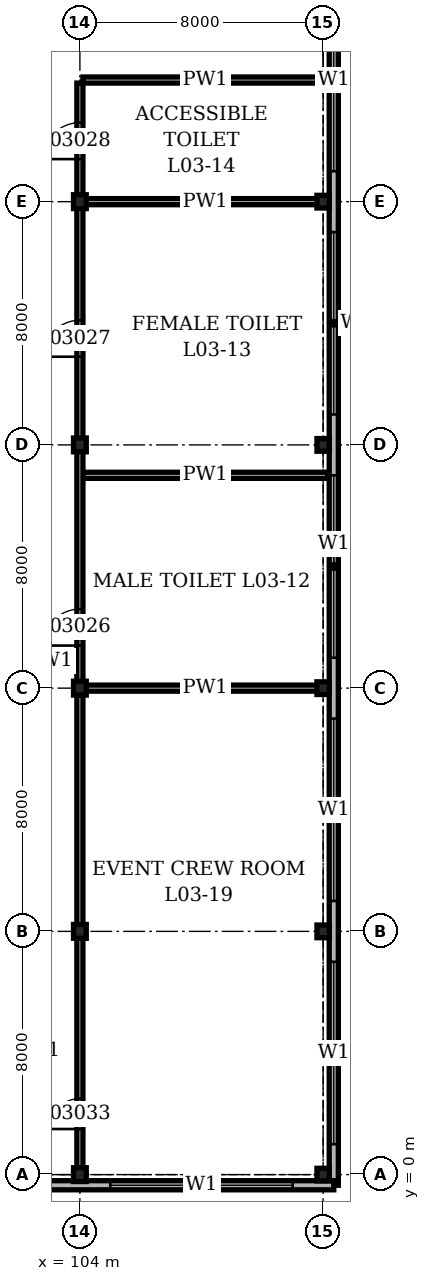
"""IFC4 building model, lengths in metres.
Left out: names, types, materials, properties, quantities, classifications, styles, units other than length and angle.
Written with IfcOpenShell. Run it as: python <this file> out.ifc"""

import sys

from ifc_helpers import new_model, si_unit, direction, frame, frame_2d, origin, origin_2d, place, context, subcontext, project, spatial, rectangle, i_section, extrude, element, fill, save


model = new_model("IFC4")
c1 = context("Model", 3, precision=1e-05, world=origin(), true_north=direction((0.0, 1.0)))
c2 = subcontext(c1, "Body", "Model", "MODEL_VIEW")
j1 = project(units=[si_unit("LENGTHUNIT", "METRE"), si_unit("PLANEANGLEUNIT", "RADIAN")], contexts=[c1])
p1 = place(None, origin())
s1 = spatial("IfcSite", under=j1, at=p1, CompositionType="ELEMENT")
p2 = place(p1, origin())
s2 = spatial("IfcBuilding", under=s1, at=p2, CompositionType="ELEMENT")
p3 = place(p2, frame((0.0, 0.0, 14.9)))
s3 = spatial("IfcBuildingStorey", under=s2, at=p3, CompositionType="ELEMENT", Elevation=14.9)
for number, where, z_axis, x_axis in (
    (1, (104.0, 0.0, 0.0), (0.0, 0.0, 1.0), (1.0, 0.0, 0.0)),
    (2, (104.0, 8.0, 0.0), (0.0, 0.0, 1.0), (1.0, 0.0, 0.0)),
    (3, (104.0, 16.0, 0.0), (0.0, 0.0, 1.0), (1.0, 0.0, 0.0)),
    (4, (104.0, 24.0, 0.0), (0.0, 0.0, 1.0), (1.0, 0.0, 0.0)),
    (5, (104.0, 32.0, 0.0), (0.0, 0.0, 1.0), (1.0, 0.0, 0.0)),
):
    element("IfcColumn", number, at=place(p3, frame(where, z_axis=z_axis, x_axis=x_axis)), inside=s3, PredefinedType="COLUMN", context=c2, shape_type="SweptSolid", body=[
        extrude(i_section(OverallWidth=0.419, OverallDepth=0.455, WebThickness=0.042, FlangeThickness=0.068, at=origin_2d()), origin(), (0.0, 0.0, 1.0), 5.0),
    ])
for number, where, z_axis, x_axis in (
    (6, (112.0, 0.0, 0.0), (0.0, 0.0, 1.0), (1.0, 0.0, 0.0)),
    (7, (112.0, 8.0, 0.0), (0.0, 0.0, 1.0), (1.0, 0.0, 0.0)),
    (8, (112.0, 16.0, 0.0), (0.0, 0.0, 1.0), (1.0, 0.0, 0.0)),
    (9, (112.0, 24.0, 0.0), (0.0, 0.0, 1.0), (1.0, 0.0, 0.0)),
    (10, (112.0, 32.0, 0.0), (0.0, 0.0, 1.0), (1.0, 0.0, 0.0)),
):
    element("IfcColumn", number, at=place(p3, frame(where, z_axis=z_axis, x_axis=x_axis)), inside=s3, PredefinedType="COLUMN", context=c2, shape_type="SweptSolid", body=[
        extrude(i_section(OverallWidth=0.406, OverallDepth=0.417, WebThickness=0.03, FlangeThickness=0.048, at=origin_2d()), origin(), (0.0, 0.0, 1.0), 5.0),
    ])
p4 = place(p3, frame((-0.35, -0.35, 0.0), z_axis=(0.0, 0.0, 1.0), x_axis=(1.0, 0.0, 0.0)))
e11 = element("IfcWall", 11, at=p4, inside=s3, PredefinedType="SOLIDWALL", context=c2, shape_type="SweptSolid", body=[
    extrude(rectangle(XDim=112.7, YDim=0.3, at=frame_2d((56.35, 0.0))), origin(), (0.0, 0.0, 1.0), 5.0),
])
p5 = place(p4, frame((1.35, 0.0, 1.0)))
e12 = element("IfcOpeningElement", 12, at=p5, cuts=e11, PredefinedType="OPENING", context=c2, shape_type="SweptSolid", body=[
    extrude(rectangle(XDim=6.0, YDim=1.5, at=frame_2d((3.0, 0.75))), frame((0.0, 0.16, 0.0), z_axis=(0.0, -1.0, 0.0), x_axis=(1.0, 0.0, 0.0)), (0.0, 0.0, 1.0), 0.32),
])
p6 = place(p4, frame((9.35, 0.0, 1.0)))
e13 = element("IfcOpeningElement", 13, at=p6, cuts=e11, PredefinedType="OPENING", context=c2, shape_type="SweptSolid", body=[
    extrude(rectangle(XDim=6.0, YDim=1.5, at=frame_2d((3.0, 0.75))), frame((0.0, 0.16, 0.0), z_axis=(0.0, -1.0, 0.0), x_axis=(1.0, 0.0, 0.0)), (0.0, 0.0, 1.0), 0.32),
])
p7 = place(p4, frame((17.35, 0.0, 1.0)))
e14 = element("IfcOpeningElement", 14, at=p7, cuts=e11, PredefinedType="OPENING", context=c2, shape_type="SweptSolid", body=[
    extrude(rectangle(XDim=6.0, YDim=1.5, at=frame_2d((3.0, 0.75))), frame((0.0, 0.16, 0.0), z_axis=(0.0, -1.0, 0.0), x_axis=(1.0, 0.0, 0.0)), (0.0, 0.0, 1.0), 0.32),
])
p8 = place(p4, frame((25.35, 0.0, 1.0)))
e15 = element("IfcOpeningElement", 15, at=p8, cuts=e11, PredefinedType="OPENING", context=c2, shape_type="SweptSolid", body=[
    extrude(rectangle(XDim=6.0, YDim=1.5, at=frame_2d((3.0, 0.75))), frame((0.0, 0.16, 0.0), z_axis=(0.0, -1.0, 0.0), x_axis=(1.0, 0.0, 0.0)), (0.0, 0.0, 1.0), 0.32),
])
p9 = place(p4, frame((33.35, 0.0, 1.0)))
e16 = element("IfcOpeningElement", 16, at=p9, cuts=e11, PredefinedType="OPENING", context=c2, shape_type="SweptSolid", body=[
    extrude(rectangle(XDim=6.0, YDim=1.5, at=frame_2d((3.0, 0.75))), frame((0.0, 0.16, 0.0), z_axis=(0.0, -1.0, 0.0), x_axis=(1.0, 0.0, 0.0)), (0.0, 0.0, 1.0), 0.32),
])
p10 = place(p4, frame((41.35, 0.0, 1.0)))
e17 = element("IfcOpeningElement", 17, at=p10, cuts=e11, PredefinedType="OPENING", context=c2, shape_type="SweptSolid", body=[
    extrude(rectangle(XDim=6.0, YDim=1.5, at=frame_2d((3.0, 0.75))), frame((0.0, 0.16, 0.0), z_axis=(0.0, -1.0, 0.0), x_axis=(1.0, 0.0, 0.0)), (0.0, 0.0, 1.0), 0.32),
])
p11 = place(p4, frame((49.35, 0.0, 1.0)))
e18 = element("IfcOpeningElement", 18, at=p11, cuts=e11, PredefinedType="OPENING", context=c2, shape_type="SweptSolid", body=[
    extrude(rectangle(XDim=6.0, YDim=1.5, at=frame_2d((3.0, 0.75))), frame((0.0, 0.16, 0.0), z_axis=(0.0, -1.0, 0.0), x_axis=(1.0, 0.0, 0.0)), (0.0, 0.0, 1.0), 0.32),
])
p12 = place(p4, frame((57.35, 0.0, 1.0)))
e19 = element("IfcOpeningElement", 19, at=p12, cuts=e11, PredefinedType="OPENING", context=c2, shape_type="SweptSolid", body=[
    extrude(rectangle(XDim=6.0, YDim=1.5, at=frame_2d((3.0, 0.75))), frame((0.0, 0.16, 0.0), z_axis=(0.0, -1.0, 0.0), x_axis=(1.0, 0.0, 0.0)), (0.0, 0.0, 1.0), 0.32),
])
p13 = place(p4, frame((65.35, 0.0, 1.0)))
e20 = element("IfcOpeningElement", 20, at=p13, cuts=e11, PredefinedType="OPENING", context=c2, shape_type="SweptSolid", body=[
    extrude(rectangle(XDim=6.0, YDim=1.5, at=frame_2d((3.0, 0.75))), frame((0.0, 0.16, 0.0), z_axis=(0.0, -1.0, 0.0), x_axis=(1.0, 0.0, 0.0)), (0.0, 0.0, 1.0), 0.32),
])
p14 = place(p4, frame((73.35, 0.0, 1.0)))
e21 = element("IfcOpeningElement", 21, at=p14, cuts=e11, PredefinedType="OPENING", context=c2, shape_type="SweptSolid", body=[
    extrude(rectangle(XDim=6.0, YDim=1.5, at=frame_2d((3.0, 0.75))), frame((0.0, 0.16, 0.0), z_axis=(0.0, -1.0, 0.0), x_axis=(1.0, 0.0, 0.0)), (0.0, 0.0, 1.0), 0.32),
])
p15 = place(p4, frame((81.35, 0.0, 1.0)))
e22 = element("IfcOpeningElement", 22, at=p15, cuts=e11, PredefinedType="OPENING", context=c2, shape_type="SweptSolid", body=[
    extrude(rectangle(XDim=6.0, YDim=1.5, at=frame_2d((3.0, 0.75))), frame((0.0, 0.16, 0.0), z_axis=(0.0, -1.0, 0.0), x_axis=(1.0, 0.0, 0.0)), (0.0, 0.0, 1.0), 0.32),
])
p16 = place(p4, frame((89.35, 0.0, 1.0)))
e23 = element("IfcOpeningElement", 23, at=p16, cuts=e11, PredefinedType="OPENING", context=c2, shape_type="SweptSolid", body=[
    extrude(rectangle(XDim=6.0, YDim=1.5, at=frame_2d((3.0, 0.75))), frame((0.0, 0.16, 0.0), z_axis=(0.0, -1.0, 0.0), x_axis=(1.0, 0.0, 0.0)), (0.0, 0.0, 1.0), 0.32),
])
p17 = place(p4, frame((97.35, 0.0, 1.0)))
e24 = element("IfcOpeningElement", 24, at=p17, cuts=e11, PredefinedType="OPENING", context=c2, shape_type="SweptSolid", body=[
    extrude(rectangle(XDim=6.0, YDim=1.5, at=frame_2d((3.0, 0.75))), frame((0.0, 0.16, 0.0), z_axis=(0.0, -1.0, 0.0), x_axis=(1.0, 0.0, 0.0)), (0.0, 0.0, 1.0), 0.32),
])
p18 = place(p4, frame((105.35, 0.0, 1.0)))
e25 = element("IfcOpeningElement", 25, at=p18, cuts=e11, PredefinedType="OPENING", context=c2, shape_type="SweptSolid", body=[
    extrude(rectangle(XDim=6.0, YDim=1.5, at=frame_2d((3.0, 0.75))), frame((0.0, 0.16, 0.0), z_axis=(0.0, -1.0, 0.0), x_axis=(1.0, 0.0, 0.0)), (0.0, 0.0, 1.0), 0.32),
])
p19 = place(p3, frame((112.35, -0.35, 0.0), z_axis=(0.0, 0.0, 1.0), x_axis=(0.0, 1.0, 0.0)))
e26 = element("IfcWall", 26, at=p19, inside=s3, PredefinedType="SOLIDWALL", context=c2, shape_type="SweptSolid", body=[
    extrude(rectangle(XDim=112.7, YDim=0.3, at=frame_2d((56.35, 0.0))), origin(), (0.0, 0.0, 1.0), 5.0),
])
p20 = place(p19, frame((1.35, 0.0, 1.0)))
e27 = element("IfcOpeningElement", 27, at=p20, cuts=e26, PredefinedType="OPENING", context=c2, shape_type="SweptSolid", body=[
    extrude(rectangle(XDim=6.0, YDim=1.5, at=frame_2d((3.0, 0.75))), frame((0.0, 0.16, 0.0), z_axis=(0.0, -1.0, 0.0), x_axis=(1.0, 0.0, 0.0)), (0.0, 0.0, 1.0), 0.32),
])
p21 = place(p19, frame((9.35, 0.0, 1.0)))
e28 = element("IfcOpeningElement", 28, at=p21, cuts=e26, PredefinedType="OPENING", context=c2, shape_type="SweptSolid", body=[
    extrude(rectangle(XDim=6.0, YDim=1.5, at=frame_2d((3.0, 0.75))), frame((0.0, 0.16, 0.0), z_axis=(0.0, -1.0, 0.0), x_axis=(1.0, 0.0, 0.0)), (0.0, 0.0, 1.0), 0.32),
])
p22 = place(p19, frame((17.35, 0.0, 1.0)))
e29 = element("IfcOpeningElement", 29, at=p22, cuts=e26, PredefinedType="OPENING", context=c2, shape_type="SweptSolid", body=[
    extrude(rectangle(XDim=6.0, YDim=1.5, at=frame_2d((3.0, 0.75))), frame((0.0, 0.16, 0.0), z_axis=(0.0, -1.0, 0.0), x_axis=(1.0, 0.0, 0.0)), (0.0, 0.0, 1.0), 0.32),
])
p23 = place(p19, frame((25.35, 0.0, 1.0)))
e30 = element("IfcOpeningElement", 30, at=p23, cuts=e26, PredefinedType="OPENING", context=c2, shape_type="SweptSolid", body=[
    extrude(rectangle(XDim=6.0, YDim=1.5, at=frame_2d((3.0, 0.75))), frame((0.0, 0.16, 0.0), z_axis=(0.0, -1.0, 0.0), x_axis=(1.0, 0.0, 0.0)), (0.0, 0.0, 1.0), 0.32),
])
p24 = place(p19, frame((33.35, 0.0, 1.0)))
e31 = element("IfcOpeningElement", 31, at=p24, cuts=e26, PredefinedType="OPENING", context=c2, shape_type="SweptSolid", body=[
    extrude(rectangle(XDim=6.0, YDim=1.5, at=frame_2d((3.0, 0.75))), frame((0.0, 0.16, 0.0), z_axis=(0.0, -1.0, 0.0), x_axis=(1.0, 0.0, 0.0)), (0.0, 0.0, 1.0), 0.32),
])
p25 = place(p19, frame((41.35, 0.0, 1.0)))
e32 = element("IfcOpeningElement", 32, at=p25, cuts=e26, PredefinedType="OPENING", context=c2, shape_type="SweptSolid", body=[
    extrude(rectangle(XDim=6.0, YDim=1.5, at=frame_2d((3.0, 0.75))), frame((0.0, 0.16, 0.0), z_axis=(0.0, -1.0, 0.0), x_axis=(1.0, 0.0, 0.0)), (0.0, 0.0, 1.0), 0.32),
])
p26 = place(p19, frame((49.35, 0.0, 1.0)))
e33 = element("IfcOpeningElement", 33, at=p26, cuts=e26, PredefinedType="OPENING", context=c2, shape_type="SweptSolid", body=[
    extrude(rectangle(XDim=6.0, YDim=1.5, at=frame_2d((3.0, 0.75))), frame((0.0, 0.16, 0.0), z_axis=(0.0, -1.0, 0.0), x_axis=(1.0, 0.0, 0.0)), (0.0, 0.0, 1.0), 0.32),
])
p27 = place(p19, frame((57.35, 0.0, 1.0)))
e34 = element("IfcOpeningElement", 34, at=p27, cuts=e26, PredefinedType="OPENING", context=c2, shape_type="SweptSolid", body=[
    extrude(rectangle(XDim=6.0, YDim=1.5, at=frame_2d((3.0, 0.75))), frame((0.0, 0.16, 0.0), z_axis=(0.0, -1.0, 0.0), x_axis=(1.0, 0.0, 0.0)), (0.0, 0.0, 1.0), 0.32),
])
p28 = place(p19, frame((65.35, 0.0, 1.0)))
e35 = element("IfcOpeningElement", 35, at=p28, cuts=e26, PredefinedType="OPENING", context=c2, shape_type="SweptSolid", body=[
    extrude(rectangle(XDim=6.0, YDim=1.5, at=frame_2d((3.0, 0.75))), frame((0.0, 0.16, 0.0), z_axis=(0.0, -1.0, 0.0), x_axis=(1.0, 0.0, 0.0)), (0.0, 0.0, 1.0), 0.32),
])
p29 = place(p19, frame((73.35, 0.0, 1.0)))
e36 = element("IfcOpeningElement", 36, at=p29, cuts=e26, PredefinedType="OPENING", context=c2, shape_type="SweptSolid", body=[
    extrude(rectangle(XDim=6.0, YDim=1.5, at=frame_2d((3.0, 0.75))), frame((0.0, 0.16, 0.0), z_axis=(0.0, -1.0, 0.0), x_axis=(1.0, 0.0, 0.0)), (0.0, 0.0, 1.0), 0.32),
])
p30 = place(p19, frame((81.35, 0.0, 1.0)))
e37 = element("IfcOpeningElement", 37, at=p30, cuts=e26, PredefinedType="OPENING", context=c2, shape_type="SweptSolid", body=[
    extrude(rectangle(XDim=6.0, YDim=1.5, at=frame_2d((3.0, 0.75))), frame((0.0, 0.16, 0.0), z_axis=(0.0, -1.0, 0.0), x_axis=(1.0, 0.0, 0.0)), (0.0, 0.0, 1.0), 0.32),
])
p31 = place(p19, frame((89.35, 0.0, 1.0)))
e38 = element("IfcOpeningElement", 38, at=p31, cuts=e26, PredefinedType="OPENING", context=c2, shape_type="SweptSolid", body=[
    extrude(rectangle(XDim=6.0, YDim=1.5, at=frame_2d((3.0, 0.75))), frame((0.0, 0.16, 0.0), z_axis=(0.0, -1.0, 0.0), x_axis=(1.0, 0.0, 0.0)), (0.0, 0.0, 1.0), 0.32),
])
p32 = place(p19, frame((97.35, 0.0, 1.0)))
e39 = element("IfcOpeningElement", 39, at=p32, cuts=e26, PredefinedType="OPENING", context=c2, shape_type="SweptSolid", body=[
    extrude(rectangle(XDim=6.0, YDim=1.5, at=frame_2d((3.0, 0.75))), frame((0.0, 0.16, 0.0), z_axis=(0.0, -1.0, 0.0), x_axis=(1.0, 0.0, 0.0)), (0.0, 0.0, 1.0), 0.32),
])
p33 = place(p19, frame((105.35, 0.0, 1.0)))
e40 = element("IfcOpeningElement", 40, at=p33, cuts=e26, PredefinedType="OPENING", context=c2, shape_type="SweptSolid", body=[
    extrude(rectangle(XDim=6.0, YDim=1.5, at=frame_2d((3.0, 0.75))), frame((0.0, 0.16, 0.0), z_axis=(0.0, -1.0, 0.0), x_axis=(1.0, 0.0, 0.0)), (0.0, 0.0, 1.0), 0.32),
])
p34 = place(p3, frame((104.1, 16.0, 0.0), z_axis=(0.0, 0.0, 1.0), x_axis=(1.0, 0.0, 0.0)))
e41 = element("IfcWall", 41, at=p34, inside=s3, PredefinedType="PARTITIONING", context=c2, shape_type="SweptSolid", body=[
    extrude(rectangle(XDim=8.05, YDim=0.2, at=frame_2d((4.025, 0.0))), origin(), (0.0, 0.0, 1.0), 4.028),
])
p35 = place(p3, frame((104.1, 23.0, 0.0), z_axis=(0.0, 0.0, 1.0), x_axis=(1.0, 0.0, 0.0)))
e42 = element("IfcWall", 42, at=p35, inside=s3, PredefinedType="PARTITIONING", context=c2, shape_type="SweptSolid", body=[
    extrude(rectangle(XDim=8.05, YDim=0.2, at=frame_2d((4.025, 0.0))), origin(), (0.0, 0.0, 1.0), 4.8),
])
p36 = place(p3, frame((104.1, 32.0, 0.0), z_axis=(0.0, 0.0, 1.0), x_axis=(1.0, 0.0, 0.0)))
e43 = element("IfcWall", 43, at=p36, inside=s3, PredefinedType="PARTITIONING", context=c2, shape_type="SweptSolid", body=[
    extrude(rectangle(XDim=8.05, YDim=0.2, at=frame_2d((4.025, 0.0))), origin(), (0.0, 0.0, 1.0), 4.028),
])
p37 = place(p3, frame((104.1, 36.0, 0.0), z_axis=(0.0, 0.0, 1.0), x_axis=(1.0, 0.0, 0.0)))
e44 = element("IfcWall", 44, at=p37, inside=s3, PredefinedType="PARTITIONING", context=c2, shape_type="SweptSolid", body=[
    extrude(rectangle(XDim=8.05, YDim=0.2, at=frame_2d((4.025, 0.0))), origin(), (0.0, 0.0, 1.0), 4.8),
])
p38 = place(p3, frame((104.0, -0.15, 0.0), z_axis=(0.0, 0.0, 1.0), x_axis=(0.0, 1.0, 0.0)))
e45 = element("IfcWall", 45, at=p38, inside=s3, PredefinedType="PARTITIONING", context=c2, shape_type="SweptSolid", body=[
    extrude(rectangle(XDim=36.05, YDim=0.2, at=frame_2d((18.025, 0.0))), origin(), (0.0, 0.0, 1.0), 4.028),
])
p39 = place(p38, frame((17.55, 0.0, 0.0)))
e46 = element("IfcOpeningElement", 46, at=p39, cuts=e45, PredefinedType="OPENING", context=c2, shape_type="SweptSolid", body=[
    extrude(rectangle(XDim=1.2, YDim=2.1, at=frame_2d((0.6, 1.05))), frame((0.0, 0.11, 0.0), z_axis=(0.0, -1.0, 0.0), x_axis=(1.0, 0.0, 0.0)), (0.0, 0.0, 1.0), 0.22),
])
p40 = place(p38, frame((27.05, 0.0, 0.0)))
e47 = element("IfcOpeningElement", 47, at=p40, cuts=e45, PredefinedType="OPENING", context=c2, shape_type="SweptSolid", body=[
    extrude(rectangle(XDim=1.2, YDim=2.1, at=frame_2d((0.6, 1.05))), frame((0.0, 0.11, 0.0), z_axis=(0.0, -1.0, 0.0), x_axis=(1.0, 0.0, 0.0)), (0.0, 0.0, 1.0), 0.22),
])
p41 = place(p38, frame((33.55, 0.0, 0.0)))
e48 = element("IfcOpeningElement", 48, at=p41, cuts=e45, PredefinedType="OPENING", context=c2, shape_type="SweptSolid", body=[
    extrude(rectangle(XDim=1.2, YDim=2.1, at=frame_2d((0.6, 1.05))), frame((0.0, 0.11, 0.0), z_axis=(0.0, -1.0, 0.0), x_axis=(1.0, 0.0, 0.0)), (0.0, 0.0, 1.0), 0.22),
])
p42 = place(p38, frame((1.65, 0.0, 0.0)))
e49 = element("IfcOpeningElement", 49, at=p42, cuts=e45, PredefinedType="OPENING", context=c2, shape_type="SweptSolid", body=[
    extrude(rectangle(XDim=1.0, YDim=2.1, at=frame_2d((0.5, 1.05))), frame((0.0, 0.11, 0.0), z_axis=(0.0, -1.0, 0.0), x_axis=(1.0, 0.0, 0.0)), (0.0, 0.0, 1.0), 0.22),
])
p43 = place(p18, origin())
e50 = element("IfcWindow", 50, at=p43, inside=s3, PartitioningType="SINGLE_PANEL", PredefinedType="WINDOW", context=c2, shape_type="SweptSolid", body=[
    extrude(rectangle(XDim=6.0, YDim=1.5, at=frame_2d((3.0, 0.75))), frame((0.0, 0.03, 0.0), z_axis=(0.0, -1.0, 0.0), x_axis=(1.0, 0.0, 0.0)), (0.0, 0.0, 1.0), 0.06),
])
fill(e25, e50)
p44 = place(p20, origin())
e51 = element("IfcWindow", 51, at=p44, inside=s3, PartitioningType="SINGLE_PANEL", PredefinedType="WINDOW", context=c2, shape_type="SweptSolid", body=[
    extrude(rectangle(XDim=6.0, YDim=1.5, at=frame_2d((3.0, 0.75))), frame((0.0, 0.03, 0.0), z_axis=(0.0, -1.0, 0.0), x_axis=(1.0, 0.0, 0.0)), (0.0, 0.0, 1.0), 0.06),
])
fill(e27, e51)
p45 = place(p21, origin())
e52 = element("IfcWindow", 52, at=p45, inside=s3, PartitioningType="SINGLE_PANEL", PredefinedType="WINDOW", context=c2, shape_type="SweptSolid", body=[
    extrude(rectangle(XDim=6.0, YDim=1.5, at=frame_2d((3.0, 0.75))), frame((0.0, 0.03, 0.0), z_axis=(0.0, -1.0, 0.0), x_axis=(1.0, 0.0, 0.0)), (0.0, 0.0, 1.0), 0.06),
])
fill(e28, e52)
p46 = place(p22, origin())
e53 = element("IfcWindow", 53, at=p46, inside=s3, PartitioningType="SINGLE_PANEL", PredefinedType="WINDOW", context=c2, shape_type="SweptSolid", body=[
    extrude(rectangle(XDim=6.0, YDim=1.5, at=frame_2d((3.0, 0.75))), frame((0.0, 0.03, 0.0), z_axis=(0.0, -1.0, 0.0), x_axis=(1.0, 0.0, 0.0)), (0.0, 0.0, 1.0), 0.06),
])
fill(e29, e53)
p47 = place(p23, origin())
e54 = element("IfcWindow", 54, at=p47, inside=s3, PartitioningType="SINGLE_PANEL", PredefinedType="WINDOW", context=c2, shape_type="SweptSolid", body=[
    extrude(rectangle(XDim=6.0, YDim=1.5, at=frame_2d((3.0, 0.75))), frame((0.0, 0.03, 0.0), z_axis=(0.0, -1.0, 0.0), x_axis=(1.0, 0.0, 0.0)), (0.0, 0.0, 1.0), 0.06),
])
fill(e30, e54)
p48 = place(p24, origin())
e55 = element("IfcWindow", 55, at=p48, inside=s3, PartitioningType="SINGLE_PANEL", PredefinedType="WINDOW", context=c2, shape_type="SweptSolid", body=[
    extrude(rectangle(XDim=6.0, YDim=1.5, at=frame_2d((3.0, 0.75))), frame((0.0, 0.03, 0.0), z_axis=(0.0, -1.0, 0.0), x_axis=(1.0, 0.0, 0.0)), (0.0, 0.0, 1.0), 0.06),
])
fill(e31, e55)
p49 = place(p39, origin())
e56 = element("IfcDoor", 56, at=p49, inside=s3, OperationType="SINGLE_SWING_RIGHT", PredefinedType="DOOR", context=c2, shape_type="SweptSolid", body=[
    extrude(rectangle(XDim=1.2, YDim=2.1, at=frame_2d((0.6, 1.05))), frame((0.0, 0.1, 0.0), z_axis=(0.0, -1.0, 0.0), x_axis=(1.0, 0.0, 0.0)), (0.0, 0.0, 1.0), 0.199),
])
fill(e46, e56)
p50 = place(p40, origin())
e57 = element("IfcDoor", 57, at=p50, inside=s3, OperationType="SINGLE_SWING_RIGHT", PredefinedType="DOOR", context=c2, shape_type="SweptSolid", body=[
    extrude(rectangle(XDim=1.2, YDim=2.1, at=frame_2d((0.6, 1.05))), frame((0.0, 0.1, 0.0), z_axis=(0.0, -1.0, 0.0), x_axis=(1.0, 0.0, 0.0)), (0.0, 0.0, 1.0), 0.199),
])
fill(e47, e57)
p51 = place(p41, origin())
e58 = element("IfcDoor", 58, at=p51, inside=s3, OperationType="SINGLE_SWING_RIGHT", PredefinedType="DOOR", context=c2, shape_type="SweptSolid", body=[
    extrude(rectangle(XDim=1.2, YDim=2.1, at=frame_2d((0.6, 1.05))), frame((0.0, 0.1, 0.0), z_axis=(0.0, -1.0, 0.0), x_axis=(1.0, 0.0, 0.0)), (0.0, 0.0, 1.0), 0.199),
])
fill(e48, e58)
p52 = place(p42, origin())
e59 = element("IfcDoor", 59, at=p52, inside=s3, OperationType="SINGLE_SWING_LEFT", PredefinedType="DOOR", context=c2, shape_type="SweptSolid", body=[
    extrude(rectangle(XDim=1.0, YDim=2.1, at=frame_2d((0.5, 1.05))), frame((0.0, 0.1, 0.0), z_axis=(0.0, -1.0, 0.0), x_axis=(1.0, 0.0, 0.0)), (0.0, 0.0, 1.0), 0.199),
])
fill(e49, e59)
save(model, sys.argv[1])
